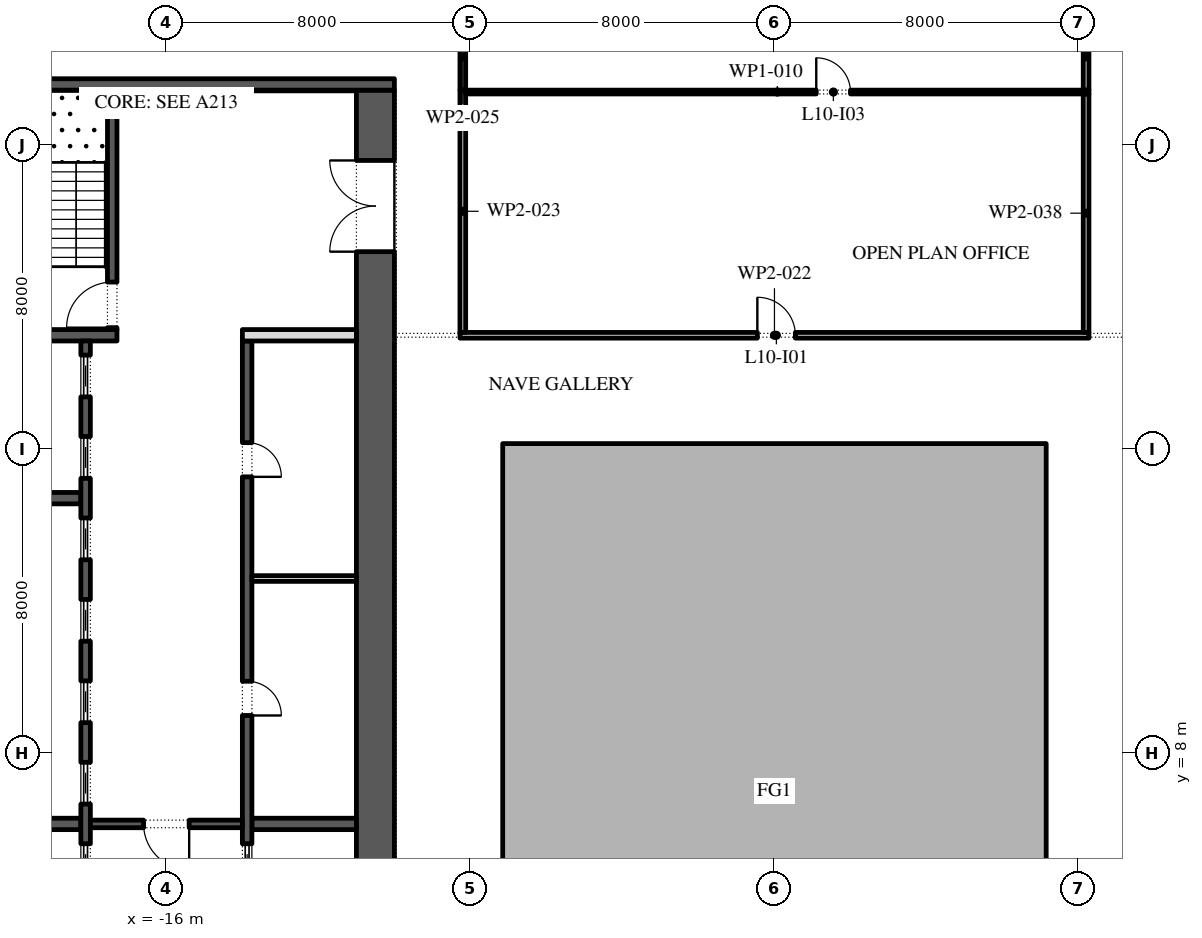
"""IFC4 building model, lengths in metres.
Left out: names, types, materials, properties, quantities, classifications, styles, units other than length and angle.
Written with IfcOpenShell. Run it as: python <this file> out.ifc"""

import sys

from ifc_helpers import new_model, si_unit, direction, frame, frame_2d, origin, place, context, subcontext, project, spatial, polyline, rectangle, outline, extrude, element, fill, save


model = new_model("IFC4")
c1 = context("Model", 3, precision=1e-05, world=origin(), true_north=direction((0.0, 1.0)))
c2 = subcontext(c1, "Body", "Model", "MODEL_VIEW")
j1 = project(units=[si_unit("LENGTHUNIT", "METRE"), si_unit("PLANEANGLEUNIT", "RADIAN")], contexts=[c1])
p1 = place(None, origin())
s1 = spatial("IfcSite", under=j1, at=p1, CompositionType="ELEMENT")
p2 = place(p1, origin())
s2 = spatial("IfcBuilding", under=s1, at=p2, CompositionType="ELEMENT")
p3 = place(p2, frame((0.0, 0.0, 52.2)))
s3 = spatial("IfcBuildingStorey", under=s2, at=p3, CompositionType="ELEMENT", Elevation=52.2)
p4 = place(p3, origin())
e1 = element("IfcWall", 1, at=p4, inside=s3, PredefinedType="STANDARD", context=c2, shape_type="SweptSolid", body=[
    extrude(outline(polyline([(-7.15, -2.15), (7.15, -2.15), (7.15, 16.15), (-7.15, 16.15), (-7.15, -2.15)]), holes=[polyline([(-7.0, -2.0), (-7.0, 16.0), (7.0, 16.0), (7.0, -2.0), (-7.0, -2.0)])]), origin(), (0.0, 0.0, 1.0), 4.0),
])
p5 = place(p3, frame((-10.5, -2.45, 0.0), z_axis=(0.0, 0.0, 1.0), x_axis=(0.0, 1.0, 0.0)))
e2 = element("IfcWall", 2, at=p5, inside=s3, PredefinedType="SHEAR", context=c2, shape_type="SweptSolid", body=[
    extrude(rectangle(XDim=27.9, YDim=1.0, at=frame_2d((13.95, 0.0))), origin(), (0.0, 0.0, 1.0), 4.0),
])
p6 = place(p5, frame((23.65, 0.0, 0.0)))
e3 = element("IfcOpeningElement", 3, at=p6, cuts=e2, PredefinedType="OPENING", context=c2, shape_type="SweptSolid", body=[
    extrude(rectangle(XDim=2.4, YDim=2.1, at=frame_2d((1.2, 1.05))), frame((0.0, 0.51, 0.0), z_axis=(0.0, -1.0, 0.0), x_axis=(1.0, 0.0, 0.0)), (0.0, 0.0, 1.0), 1.02),
])
p7 = place(p5, frame((1.387, 0.0, 0.0)))
e4 = element("IfcOpeningElement", 4, at=p7, cuts=e2, PredefinedType="OPENING", context=c2, shape_type="SweptSolid", body=[
    extrude(rectangle(XDim=0.9, YDim=2.1, at=frame_2d((0.45, 1.05))), frame((0.0, 0.51, 0.0), z_axis=(0.0, -1.0, 0.0), x_axis=(1.0, 0.0, 0.0)), (0.0, 0.0, 1.0), 1.02),
])
p8 = place(p5, frame((4.613, 0.0, 0.0)))
e5 = element("IfcOpeningElement", 5, at=p8, cuts=e2, PredefinedType="OPENING", context=c2, shape_type="SweptSolid", body=[
    extrude(rectangle(XDim=0.9, YDim=2.1, at=frame_2d((0.45, 1.05))), frame((0.0, 0.51, 0.0), z_axis=(0.0, -1.0, 0.0), x_axis=(1.0, 0.0, 0.0)), (0.0, 0.0, 1.0), 1.02),
])
p9 = place(p3, frame((-22.0, 25.6, 0.0), z_axis=(0.0, 0.0, 1.0), x_axis=(1.0, 0.0, 0.0)))
e6 = element("IfcWall", 6, at=p9, inside=s3, PredefinedType="SHEAR", context=c2, shape_type="SweptSolid", body=[
    extrude(rectangle(XDim=12.0, YDim=0.3, at=frame_2d((6.0, 0.0))), origin(), (0.0, 0.0, 1.0), 4.0),
])
p10 = place(p3, frame((-21.0, 19.0, 0.0), z_axis=(0.0, 0.0, 1.0), x_axis=(1.0, 0.0, 0.0)))
e7 = element("IfcWall", 7, at=p10, inside=s3, PredefinedType="SHEAR", context=c2, shape_type="SweptSolid", body=[
    extrude(rectangle(XDim=3.7, YDim=0.3, at=frame_2d((1.85, 0.0))), origin(), (0.0, 0.0, 1.0), 4.0),
])
p11 = place(p3, frame((-17.425, 19.15, 0.0), z_axis=(0.0, 0.0, 1.0), x_axis=(0.0, 1.0, 0.0)))
e8 = element("IfcWall", 8, at=p11, inside=s3, PredefinedType="SHEAR", context=c2, shape_type="SweptSolid", body=[
    extrude(rectangle(XDim=6.3, YDim=0.25, at=frame_2d((3.15, 0.0))), origin(), (0.0, 0.0, 1.0), 4.0),
])
p12 = place(p11, frame((0.05, 0.0, 0.0)))
e9 = element("IfcOpeningElement", 9, at=p12, cuts=e8, PredefinedType="OPENING", context=c2, shape_type="SweptSolid", body=[
    extrude(rectangle(XDim=1.2, YDim=2.1, at=frame_2d((0.6, 1.05))), frame((0.0, 0.135, 0.0), z_axis=(0.0, -1.0, 0.0), x_axis=(1.0, 0.0, 0.0)), (0.0, 0.0, 1.0), 0.27),
])
for number, where, z_axis, x_axis in (
    (10, (-21.0, 6.143, 0.0), (0.0, 0.0, 1.0), (1.0, 0.0, 0.0)),
    (11, (-21.0, 14.714, 0.0), (0.0, 0.0, 1.0), (1.0, 0.0, 0.0)),
):
    element("IfcWall", number, at=place(p3, frame(where, z_axis=z_axis, x_axis=x_axis)), inside=s3, PredefinedType="SHEAR", context=c2, shape_type="SweptSolid", body=[
        extrude(rectangle(XDim=2.75, YDim=0.3, at=frame_2d((1.375, 0.0))), origin(), (0.0, 0.0, 1.0), 4.0),
    ])
p13 = place(p3, frame((-18.125, 4.15, 0.0), z_axis=(0.0, 0.0, 1.0), x_axis=(0.0, 1.0, 0.0)))
e12 = element("IfcWall", 12, at=p13, inside=s3, PredefinedType="SHEAR", context=c2, shape_type="SweptSolid", body=[
    extrude(rectangle(XDim=14.7, YDim=0.25, at=frame_2d((7.35, 0.0))), origin(), (0.0, 0.0, 1.0), 4.0),
])
p14 = place(p13, frame((0.371, 0.0, 0.0)))
e13 = element("IfcOpeningElement", 13, at=p14, cuts=e12, PredefinedType="OPENING", context=c2, shape_type="SweptSolid", body=[
    extrude(rectangle(XDim=1.1, YDim=2.1, at=frame_2d((0.55, 1.05))), frame((0.0, 0.135, 0.0), z_axis=(0.0, -1.0, 0.0), x_axis=(1.0, 0.0, 0.0)), (0.0, 0.0, 1.0), 0.27),
])
p15 = place(p13, frame((2.514, 0.0, 0.0)))
e14 = element("IfcOpeningElement", 14, at=p15, cuts=e12, PredefinedType="OPENING", context=c2, shape_type="SweptSolid", body=[
    extrude(rectangle(XDim=1.1, YDim=2.1, at=frame_2d((0.55, 1.05))), frame((0.0, 0.135, 0.0), z_axis=(0.0, -1.0, 0.0), x_axis=(1.0, 0.0, 0.0)), (0.0, 0.0, 1.0), 0.27),
])
p16 = place(p13, frame((4.657, 0.0, 0.0)))
e15 = element("IfcOpeningElement", 15, at=p16, cuts=e12, PredefinedType="OPENING", context=c2, shape_type="SweptSolid", body=[
    extrude(rectangle(XDim=1.1, YDim=2.1, at=frame_2d((0.55, 1.05))), frame((0.0, 0.135, 0.0), z_axis=(0.0, -1.0, 0.0), x_axis=(1.0, 0.0, 0.0)), (0.0, 0.0, 1.0), 0.27),
])
p17 = place(p13, frame((6.8, 0.0, 0.0)))
e16 = element("IfcOpeningElement", 16, at=p17, cuts=e12, PredefinedType="OPENING", context=c2, shape_type="SweptSolid", body=[
    extrude(rectangle(XDim=1.1, YDim=2.1, at=frame_2d((0.55, 1.05))), frame((0.0, 0.135, 0.0), z_axis=(0.0, -1.0, 0.0), x_axis=(1.0, 0.0, 0.0)), (0.0, 0.0, 1.0), 0.27),
])
p18 = place(p13, frame((8.943, 0.0, 0.0)))
e17 = element("IfcOpeningElement", 17, at=p18, cuts=e12, PredefinedType="OPENING", context=c2, shape_type="SweptSolid", body=[
    extrude(rectangle(XDim=1.1, YDim=2.1, at=frame_2d((0.55, 1.05))), frame((0.0, 0.135, 0.0), z_axis=(0.0, -1.0, 0.0), x_axis=(1.0, 0.0, 0.0)), (0.0, 0.0, 1.0), 0.27),
])
p19 = place(p13, frame((11.086, 0.0, 0.0)))
e18 = element("IfcOpeningElement", 18, at=p19, cuts=e12, PredefinedType="OPENING", context=c2, shape_type="SweptSolid", body=[
    extrude(rectangle(XDim=1.1, YDim=2.1, at=frame_2d((0.55, 1.05))), frame((0.0, 0.135, 0.0), z_axis=(0.0, -1.0, 0.0), x_axis=(1.0, 0.0, 0.0)), (0.0, 0.0, 1.0), 0.27),
])
p20 = place(p13, frame((13.229, 0.0, 0.0)))
e19 = element("IfcOpeningElement", 19, at=p20, cuts=e12, PredefinedType="OPENING", context=c2, shape_type="SweptSolid", body=[
    extrude(rectangle(XDim=1.1, YDim=2.1, at=frame_2d((0.55, 1.05))), frame((0.0, 0.135, 0.0), z_axis=(0.0, -1.0, 0.0), x_axis=(1.0, 0.0, 0.0)), (0.0, 0.0, 1.0), 0.27),
])
p21 = place(p3, frame((-13.75, 6.143, 0.0), z_axis=(0.0, 0.0, 1.0), x_axis=(1.0, 0.0, 0.0)))
e20 = element("IfcWall", 20, at=p21, inside=s3, PredefinedType="SHEAR", context=c2, shape_type="SweptSolid", body=[
    extrude(rectangle(XDim=2.75, YDim=0.3, at=frame_2d((1.375, 0.0))), origin(), (0.0, 0.0, 1.0), 4.0),
])
p22 = place(p3, frame((-13.875, -2.45, 0.0), z_axis=(0.0, 0.0, 1.0), x_axis=(0.0, 1.0, 0.0)))
e21 = element("IfcWall", 21, at=p22, inside=s3, PredefinedType="SHEAR", context=c2, shape_type="SweptSolid", body=[
    extrude(rectangle(XDim=21.3, YDim=0.25, at=frame_2d((10.65, 0.0))), origin(), (0.0, 0.0, 1.0), 4.0),
])
p23 = place(p22, frame((11.446, 0.0, 0.0)))
e22 = element("IfcOpeningElement", 22, at=p23, cuts=e21, PredefinedType="OPENING", context=c2, shape_type="SweptSolid", body=[
    extrude(rectangle(XDim=0.9, YDim=2.1, at=frame_2d((0.45, 1.05))), frame((0.0, 0.135, 0.0), z_axis=(0.0, -1.0, 0.0), x_axis=(1.0, 0.0, 0.0)), (0.0, 0.0, 1.0), 0.27),
])
p24 = place(p22, frame((17.725, 0.0, 0.0)))
e23 = element("IfcOpeningElement", 23, at=p24, cuts=e21, PredefinedType="OPENING", context=c2, shape_type="SweptSolid", body=[
    extrude(rectangle(XDim=0.9, YDim=2.1, at=frame_2d((0.45, 1.05))), frame((0.0, 0.135, 0.0), z_axis=(0.0, -1.0, 0.0), x_axis=(1.0, 0.0, 0.0)), (0.0, 0.0, 1.0), 0.27),
])
p25 = place(p22, frame((6.971, 0.0, 0.0)))
e24 = element("IfcOpeningElement", 24, at=p25, cuts=e21, PredefinedType="OPENING", context=c2, shape_type="SweptSolid", body=[
    extrude(rectangle(XDim=1.1, YDim=2.1, at=frame_2d((0.55, 1.05))), frame((0.0, 0.135, 0.0), z_axis=(0.0, -1.0, 0.0), x_axis=(1.0, 0.0, 0.0)), (0.0, 0.0, 1.0), 0.27),
])
p26 = place(p3, frame((-14.0, 19.0, 0.0), z_axis=(0.0, 0.0, 1.0), x_axis=(1.0, 0.0, 0.0)))
e25 = element("IfcWall", 25, at=p26, inside=s3, PredefinedType="PARTITIONING", context=c2, shape_type="SweptSolid", body=[
    extrude(rectangle(XDim=3.0, YDim=0.3, at=frame_2d((1.5, 0.0))), origin(), (0.0, 0.0, 1.0), 4.0),
])
p27 = place(p3, frame((-13.75, 12.6, 0.0), z_axis=(0.0, 0.0, 1.0), x_axis=(1.0, 0.0, 0.0)))
e26 = element("IfcWall", 26, at=p27, inside=s3, PredefinedType="PARTITIONING", context=c2, shape_type="SweptSolid", body=[
    extrude(rectangle(XDim=2.75, YDim=0.15, at=frame_2d((1.375, 0.0))), origin(), (0.0, 0.0, 1.0), 4.0),
])
p28 = place(p3, frame((-18.0, 6.143, 0.0), z_axis=(0.0, 0.0, 1.0), x_axis=(1.0, 0.0, 0.0)))
e27 = element("IfcWall", 27, at=p28, inside=s3, PredefinedType="SHEAR", context=c2, shape_type="SweptSolid", body=[
    extrude(rectangle(XDim=4.0, YDim=0.2, at=frame_2d((2.0, 0.0))), origin(), (0.0, 0.0, 1.0), 4.0),
])
p29 = place(p28, frame((1.4, 0.0, 0.0)))
e28 = element("IfcOpeningElement", 28, at=p29, cuts=e27, PredefinedType="OPENING", context=c2, shape_type="SweptSolid", body=[
    extrude(rectangle(XDim=1.2, YDim=2.1, at=frame_2d((0.6, 1.05))), frame((0.0, 0.11, 0.0), z_axis=(0.0, -1.0, 0.0), x_axis=(1.0, 0.0, 0.0)), (0.0, 0.0, 1.0), 0.22),
])
p30 = place(p3, frame((-8.275, 19.0, 0.0), z_axis=(0.0, 0.0, 1.0), x_axis=(1.0, 0.0, 0.0)))
e29 = element("IfcWall", 29, at=p30, inside=s3, PredefinedType="PARTITIONING", context=c2, shape_type="SweptSolid", body=[
    extrude(rectangle(XDim=16.55, YDim=0.15, at=frame_2d((8.275, 0.0))), origin(), (0.0, 0.0, 1.0), 4.0),
])
p31 = place(p30, frame((7.825, 0.0, 0.0)))
e30 = element("IfcOpeningElement", 30, at=p31, cuts=e29, PredefinedType="OPENING", context=c2, shape_type="SweptSolid", body=[
    extrude(rectangle(XDim=1.0, YDim=2.1, at=frame_2d((0.5, 1.05))), frame((0.0, 0.085, 0.0), z_axis=(0.0, -1.0, 0.0), x_axis=(1.0, 0.0, 0.0)), (0.0, 0.0, 1.0), 0.17),
])
p32 = place(p3, frame((-8.2, 25.45, 0.0), z_axis=(0.0, 0.0, 1.0), x_axis=(0.0, -1.0, 0.0)))
e31 = element("IfcWall", 31, at=p32, inside=s3, PredefinedType="PARTITIONING", context=c2, shape_type="SweptSolid", body=[
    extrude(rectangle(XDim=6.375, YDim=0.15, at=frame_2d((3.188, 0.0))), origin(), (0.0, 0.0, 1.0), 4.0),
])
p33 = place(p3, frame((-8.125, 25.4, 0.0), z_axis=(0.0, 0.0, 1.0), x_axis=(1.0, 0.0, 0.0)))
e32 = element("IfcWall", 32, at=p33, inside=s3, PredefinedType="PARTITIONING", context=c2, shape_type="SweptSolid", body=[
    extrude(rectangle(XDim=16.4, YDim=0.1, at=frame_2d((8.2, 0.0))), origin(), (0.0, 0.0, 1.0), 4.0),
])
p34 = place(p33, frame((9.225, 0.0, 0.0)))
e33 = element("IfcOpeningElement", 33, at=p34, cuts=e32, PredefinedType="OPENING", context=c2, shape_type="SweptSolid", body=[
    extrude(rectangle(XDim=0.9, YDim=2.1, at=frame_2d((0.45, 1.05))), frame((0.0, 0.06, 0.0), z_axis=(0.0, -1.0, 0.0), x_axis=(1.0, 0.0, 0.0)), (0.0, 0.0, 1.0), 0.12),
])
p35 = place(p3, frame((-8.2, 27.2, 0.0), z_axis=(0.0, 0.0, 1.0), x_axis=(0.0, -1.0, 0.0)))
e34 = element("IfcWall", 34, at=p35, inside=s3, PredefinedType="PARTITIONING", context=c2, shape_type="SweptSolid", body=[
    extrude(rectangle(XDim=1.75, YDim=0.15, at=frame_2d((0.875, 0.0))), origin(), (0.0, 0.0, 1.0), 4.0),
])
p36 = place(p3, frame((8.2, 19.075, 0.0), z_axis=(0.0, 0.0, 1.0), x_axis=(0.0, 1.0, 0.0)))
e35 = element("IfcWall", 35, at=p36, inside=s3, PredefinedType="PARTITIONING", context=c2, shape_type="SweptSolid", body=[
    extrude(rectangle(XDim=6.275, YDim=0.15, at=frame_2d((3.138, 0.0))), origin(), (0.0, 0.0, 1.0), 4.0),
])
p37 = place(p3, frame((8.2, 25.45, 0.0), z_axis=(0.0, 0.0, 1.0), x_axis=(0.0, 1.0, 0.0)))
e36 = element("IfcWall", 36, at=p37, inside=s3, PredefinedType="PARTITIONING", context=c2, shape_type="SweptSolid", body=[
    extrude(rectangle(XDim=1.75, YDim=0.15, at=frame_2d((0.875, 0.0))), origin(), (0.0, 0.0, 1.0), 4.0),
])
p38 = place(p14, origin())
e37 = element("IfcDoor", 37, at=p38, inside=s3, OperationType="SLIDING_TO_LEFT", PredefinedType="DOOR", context=c2, shape_type="SweptSolid", body=[
    extrude(rectangle(XDim=1.1, YDim=2.1, at=frame_2d((0.55, 1.05))), frame((0.0, 0.025, 0.0), z_axis=(0.0, -1.0, 0.0), x_axis=(1.0, 0.0, 0.0)), (0.0, 0.0, 1.0), 0.05),
])
fill(e13, e37)
p39 = place(p15, origin())
e38 = element("IfcDoor", 38, at=p39, inside=s3, OperationType="SLIDING_TO_LEFT", PredefinedType="DOOR", context=c2, shape_type="SweptSolid", body=[
    extrude(rectangle(XDim=1.1, YDim=2.1, at=frame_2d((0.55, 1.05))), frame((0.0, 0.025, 0.0), z_axis=(0.0, -1.0, 0.0), x_axis=(1.0, 0.0, 0.0)), (0.0, 0.0, 1.0), 0.05),
])
fill(e14, e38)
p40 = place(p16, origin())
e39 = element("IfcDoor", 39, at=p40, inside=s3, OperationType="SLIDING_TO_LEFT", PredefinedType="DOOR", context=c2, shape_type="SweptSolid", body=[
    extrude(rectangle(XDim=1.1, YDim=2.1, at=frame_2d((0.55, 1.05))), frame((0.0, 0.025, 0.0), z_axis=(0.0, -1.0, 0.0), x_axis=(1.0, 0.0, 0.0)), (0.0, 0.0, 1.0), 0.05),
])
fill(e15, e39)
p41 = place(p17, origin())
e40 = element("IfcDoor", 40, at=p41, inside=s3, OperationType="SLIDING_TO_LEFT", PredefinedType="DOOR", context=c2, shape_type="SweptSolid", body=[
    extrude(rectangle(XDim=1.1, YDim=2.1, at=frame_2d((0.55, 1.05))), frame((0.0, 0.025, 0.0), z_axis=(0.0, -1.0, 0.0), x_axis=(1.0, 0.0, 0.0)), (0.0, 0.0, 1.0), 0.05),
])
fill(e16, e40)
p42 = place(p18, origin())
e41 = element("IfcDoor", 41, at=p42, inside=s3, OperationType="SLIDING_TO_LEFT", PredefinedType="DOOR", context=c2, shape_type="SweptSolid", body=[
    extrude(rectangle(XDim=1.1, YDim=2.1, at=frame_2d((0.55, 1.05))), frame((0.0, 0.025, 0.0), z_axis=(0.0, -1.0, 0.0), x_axis=(1.0, 0.0, 0.0)), (0.0, 0.0, 1.0), 0.05),
])
fill(e17, e41)
p43 = place(p19, origin())
e42 = element("IfcDoor", 42, at=p43, inside=s3, OperationType="SLIDING_TO_LEFT", PredefinedType="DOOR", context=c2, shape_type="SweptSolid", body=[
    extrude(rectangle(XDim=1.1, YDim=2.1, at=frame_2d((0.55, 1.05))), frame((0.0, 0.025, 0.0), z_axis=(0.0, -1.0, 0.0), x_axis=(1.0, 0.0, 0.0)), (0.0, 0.0, 1.0), 0.05),
])
fill(e18, e42)
p44 = place(p20, origin())
e43 = element("IfcDoor", 43, at=p44, inside=s3, OperationType="SLIDING_TO_LEFT", PredefinedType="DOOR", context=c2, shape_type="SweptSolid", body=[
    extrude(rectangle(XDim=1.1, YDim=2.1, at=frame_2d((0.55, 1.05))), frame((0.0, 0.025, 0.0), z_axis=(0.0, -1.0, 0.0), x_axis=(1.0, 0.0, 0.0)), (0.0, 0.0, 1.0), 0.05),
])
fill(e19, e43)
p45 = place(p23, frame((0.9, -0.2, 0.0), z_axis=(0.0, 0.0, 1.0), x_axis=(-1.0, 0.0, 0.0)))
e44 = element("IfcDoor", 44, at=p45, inside=s3, OperationType="SINGLE_SWING_LEFT", PredefinedType="DOOR", context=c2, shape_type="SweptSolid", body=[
    extrude(rectangle(XDim=0.9, YDim=2.1, at=frame_2d((0.45, 1.05))), frame((0.0, -0.075, 0.0), z_axis=(0.0, -1.0, 0.0), x_axis=(1.0, 0.0, 0.0)), (0.0, 0.0, 1.0), 0.05),
])
fill(e22, e44)
p46 = place(p24, frame((0.9, -0.2, 0.0), z_axis=(0.0, 0.0, 1.0), x_axis=(-1.0, 0.0, 0.0)))
e45 = element("IfcDoor", 45, at=p46, inside=s3, OperationType="SINGLE_SWING_LEFT", PredefinedType="DOOR", context=c2, shape_type="SweptSolid", body=[
    extrude(rectangle(XDim=0.9, YDim=2.1, at=frame_2d((0.45, 1.05))), frame((0.0, -0.075, 0.0), z_axis=(0.0, -1.0, 0.0), x_axis=(1.0, 0.0, 0.0)), (0.0, 0.0, 1.0), 0.05),
])
fill(e23, e45)
p47 = place(p25, origin())
e46 = element("IfcDoor", 46, at=p47, inside=s3, OperationType="SLIDING_TO_LEFT", PredefinedType="DOOR", context=c2, shape_type="SweptSolid", body=[
    extrude(rectangle(XDim=1.1, YDim=2.1, at=frame_2d((0.55, 1.05))), frame((0.0, 0.025, 0.0), z_axis=(0.0, -1.0, 0.0), x_axis=(1.0, 0.0, 0.0)), (0.0, 0.0, 1.0), 0.05),
])
fill(e24, e46)
p48 = place(p29, frame((1.2, 0.0, 0.0), z_axis=(0.0, 0.0, 1.0), x_axis=(-1.0, 0.0, 0.0)))
e47 = element("IfcDoor", 47, at=p48, inside=s3, OperationType="SINGLE_SWING_RIGHT", PredefinedType="DOOR", context=c2, shape_type="SweptSolid", body=[
    extrude(rectangle(XDim=1.2, YDim=2.1, at=frame_2d((0.6, 1.05))), frame((0.0, 0.025, 0.0), z_axis=(0.0, -1.0, 0.0), x_axis=(1.0, 0.0, 0.0)), (0.0, 0.0, 1.0), 0.05),
])
fill(e28, e47)
p49 = place(p6, origin())
e48 = element("IfcDoor", 48, at=p49, inside=s3, OperationType="DOUBLE_DOOR_SINGLE_SWING", PredefinedType="DOOR", context=c2, shape_type="SweptSolid", body=[
    extrude(rectangle(XDim=2.4, YDim=2.1, at=frame_2d((1.2, 1.05))), frame((0.0, 0.025, 0.0), z_axis=(0.0, -1.0, 0.0), x_axis=(1.0, 0.0, 0.0)), (0.0, 0.0, 1.0), 0.05),
])
fill(e3, e48)
p50 = place(p12, origin())
e49 = element("IfcDoor", 49, at=p50, inside=s3, OperationType="SINGLE_SWING_RIGHT", PredefinedType="DOOR", context=c2, shape_type="SweptSolid", body=[
    extrude(rectangle(XDim=1.2, YDim=2.1, at=frame_2d((0.6, 1.05))), frame((0.0, 0.025, 0.0), z_axis=(0.0, -1.0, 0.0), x_axis=(1.0, 0.0, 0.0)), (0.0, 0.0, 1.0), 0.05),
])
fill(e9, e49)
p51 = place(p31, origin())
e50 = element("IfcDoor", 50, at=p51, inside=s3, OperationType="SINGLE_SWING_RIGHT", PredefinedType="DOOR", context=c2, shape_type="SweptSolid", body=[
    extrude(rectangle(XDim=1.0, YDim=2.1, at=frame_2d((0.5, 1.05))), frame((0.0, 0.025, 0.0), z_axis=(0.0, -1.0, 0.0), x_axis=(1.0, 0.0, 0.0)), (0.0, 0.0, 1.0), 0.05),
])
fill(e30, e50)
p52 = place(p34, origin())
e51 = element("IfcDoor", 51, at=p52, inside=s3, OperationType="SINGLE_SWING_RIGHT", PredefinedType="DOOR", context=c2, shape_type="SweptSolid", body=[
    extrude(rectangle(XDim=0.9, YDim=2.1, at=frame_2d((0.45, 1.05))), frame((0.0, 0.025, 0.0), z_axis=(0.0, -1.0, 0.0), x_axis=(1.0, 0.0, 0.0)), (0.0, 0.0, 1.0), 0.05),
])
fill(e33, e51)
save(model, sys.argv[1])
